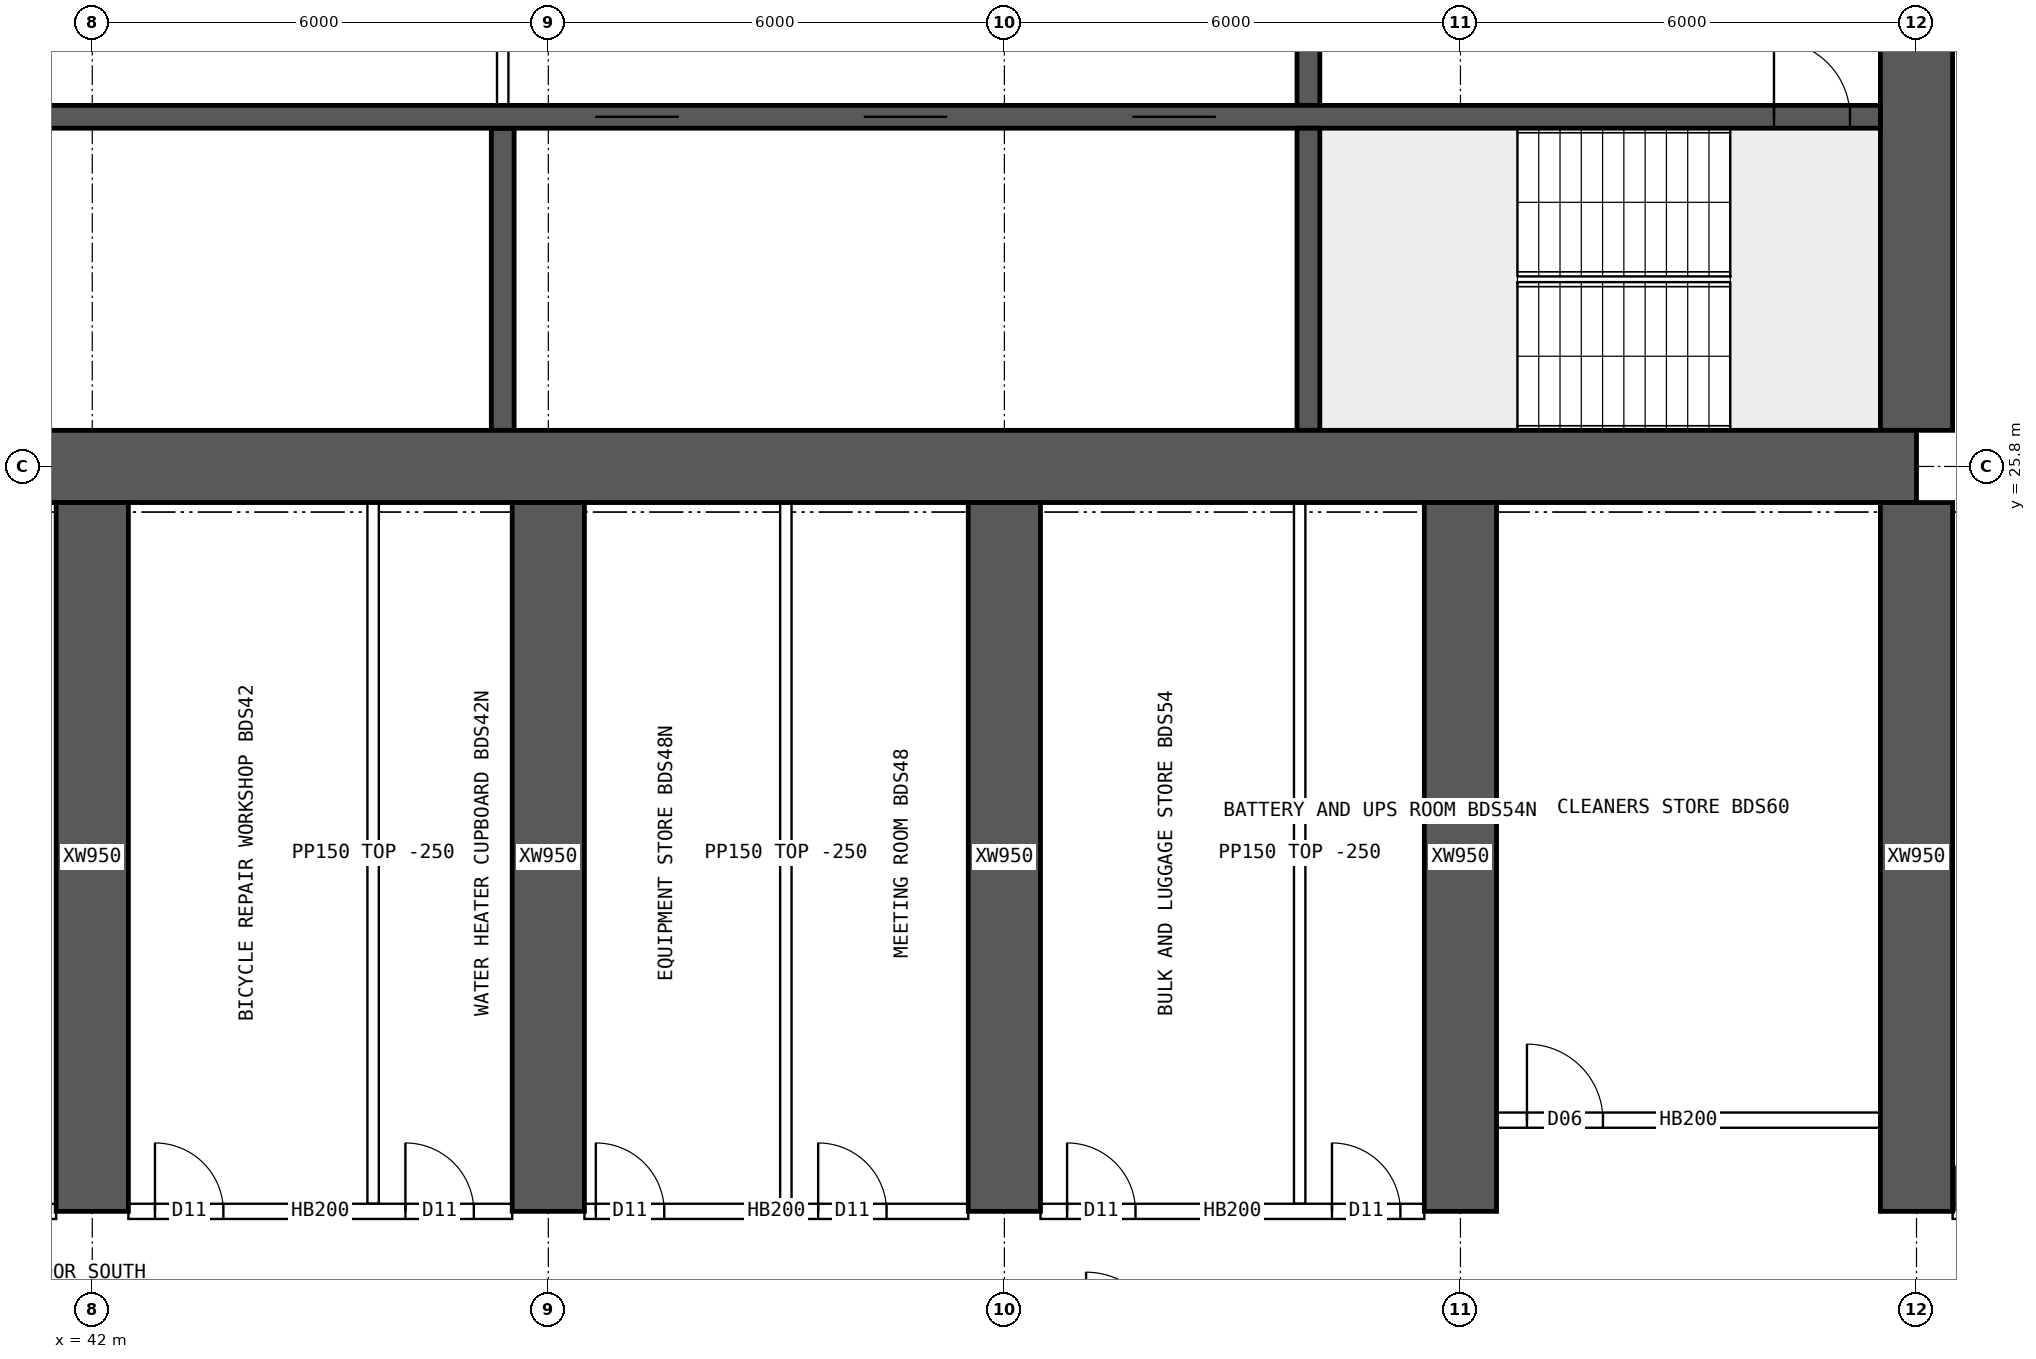
"""IFC4 building model, lengths in metres.
Left out: names, types, materials, properties, quantities, classifications, styles, units other than length and angle.
Written with IfcOpenShell. Run it as: python <this file> out.ifc"""

import sys

from ifc_helpers import new_model, si_unit, direction, frame, frame_2d, origin, place, context, subcontext, project, spatial, rectangle, extrude, element, fill, save


model = new_model("IFC4")
c1 = context("Model", 3, precision=1e-05, world=origin(), true_north=direction((0.0, 1.0)))
c2 = subcontext(c1, "Body", "Model", "MODEL_VIEW")
j1 = project(units=[si_unit("LENGTHUNIT", "METRE"), si_unit("PLANEANGLEUNIT", "RADIAN")], contexts=[c1])
p1 = place(None, origin())
s1 = spatial("IfcSite", under=j1, at=p1, CompositionType="ELEMENT")
p2 = place(p1, origin())
s2 = spatial("IfcBuilding", under=s1, at=p2, CompositionType="ELEMENT")
p3 = place(p2, frame((0.0, 0.0, 103.15)))
s3 = spatial("IfcBuildingStorey", under=s2, at=p3, CompositionType="ELEMENT", Elevation=103.15)
p4 = place(p3, frame((18.0, 25.8, 0.0), z_axis=(0.0, 0.0, 1.0), x_axis=(1.0, 0.0, 0.0)))
e1 = element("IfcWall", 1, at=p4, inside=s3, PredefinedType="SHEAR", context=c2, shape_type="SweptSolid", body=[
    extrude(rectangle(XDim=48.0, YDim=0.95, at=frame_2d((24.0, 0.0))), origin(), (0.0, 0.0, 1.0), 3.75),
])
p5 = place(p3, frame((66.0, 26.275, 0.0), z_axis=(0.0, 0.0, 1.0), x_axis=(0.0, 1.0, 0.0)))
e2 = element("IfcWall", 2, at=p5, inside=s3, PredefinedType="SHEAR", context=c2, shape_type="SweptSolid", body=[
    extrude(rectangle(XDim=11.45, YDim=0.95, at=frame_2d((5.725, 0.0))), origin(), (0.0, 0.0, 1.0), 3.75),
])
p6 = place(p5, frame((5.025, 0.0, 0.0)))
e3 = element("IfcOpeningElement", 3, at=p6, cuts=e2, PredefinedType="OPENING", context=c2, shape_type="SweptSolid", body=[
    extrude(rectangle(XDim=1.2, YDim=2.1, at=frame_2d((0.6, 1.05))), frame((0.0, 0.485, 0.0), z_axis=(0.0, -1.0, 0.0), x_axis=(1.0, 0.0, 0.0)), (0.0, 0.0, 1.0), 0.97),
])
p7 = place(p3, frame((18.475, 30.4, 0.0), z_axis=(0.0, 0.0, 1.0), x_axis=(1.0, 0.0, 0.0)))
e4 = element("IfcWall", 4, at=p7, inside=s3, PredefinedType="SHEAR", context=c2, shape_type="SweptSolid", body=[
    extrude(rectangle(XDim=47.05, YDim=0.3, at=frame_2d((23.525, 0.0))), origin(), (0.0, 0.0, 1.0), 3.75),
])
p8 = place(p7, frame((0.4, 0.0, 0.0)))
e5 = element("IfcOpeningElement", 5, at=p8, cuts=e4, PredefinedType="OPENING", context=c2, shape_type="SweptSolid", body=[
    extrude(rectangle(XDim=1.0, YDim=2.1, at=frame_2d((0.5, 1.05))), frame((0.0, 0.16, 0.0), z_axis=(0.0, -1.0, 0.0), x_axis=(1.0, 0.0, 0.0)), (0.0, 0.0, 1.0), 0.32),
])
p9 = place(p7, frame((45.65, 0.0, 0.0)))
e6 = element("IfcOpeningElement", 6, at=p9, cuts=e4, PredefinedType="OPENING", context=c2, shape_type="SweptSolid", body=[
    extrude(rectangle(XDim=1.0, YDim=2.1, at=frame_2d((0.5, 1.05))), frame((0.0, 0.16, 0.0), z_axis=(0.0, -1.0, 0.0), x_axis=(1.0, 0.0, 0.0)), (0.0, 0.0, 1.0), 0.32),
])
p10 = place(p7, frame((8.275, 0.0, 0.0)))
e7 = element("IfcOpeningElement", 7, at=p10, cuts=e4, PredefinedType="OPENING", context=c2, shape_type="SweptSolid", body=[
    extrude(rectangle(XDim=1.1, YDim=2.1, at=frame_2d((0.55, 1.05))), frame((0.0, 0.16, 0.0), z_axis=(0.0, -1.0, 0.0), x_axis=(1.0, 0.0, 0.0)), (0.0, 0.0, 1.0), 0.32),
])
p11 = place(p7, frame((10.875, 0.0, 0.0)))
e8 = element("IfcOpeningElement", 8, at=p11, cuts=e4, PredefinedType="OPENING", context=c2, shape_type="SweptSolid", body=[
    extrude(rectangle(XDim=1.1, YDim=2.1, at=frame_2d((0.55, 1.05))), frame((0.0, 0.16, 0.0), z_axis=(0.0, -1.0, 0.0), x_axis=(1.0, 0.0, 0.0)), (0.0, 0.0, 1.0), 0.32),
])
p12 = place(p7, frame((13.475, 0.0, 0.0)))
e9 = element("IfcOpeningElement", 9, at=p12, cuts=e4, PredefinedType="OPENING", context=c2, shape_type="SweptSolid", body=[
    extrude(rectangle(XDim=1.1, YDim=2.1, at=frame_2d((0.55, 1.05))), frame((0.0, 0.16, 0.0), z_axis=(0.0, -1.0, 0.0), x_axis=(1.0, 0.0, 0.0)), (0.0, 0.0, 1.0), 0.32),
])
p13 = place(p7, frame((16.075, 0.0, 0.0)))
e10 = element("IfcOpeningElement", 10, at=p13, cuts=e4, PredefinedType="OPENING", context=c2, shape_type="SweptSolid", body=[
    extrude(rectangle(XDim=1.1, YDim=2.1, at=frame_2d((0.55, 1.05))), frame((0.0, 0.16, 0.0), z_axis=(0.0, -1.0, 0.0), x_axis=(1.0, 0.0, 0.0)), (0.0, 0.0, 1.0), 0.32),
])
p14 = place(p7, frame((18.85, 0.0, 0.0)))
e11 = element("IfcOpeningElement", 11, at=p14, cuts=e4, PredefinedType="OPENING", context=c2, shape_type="SweptSolid", body=[
    extrude(rectangle(XDim=0.9, YDim=2.1, at=frame_2d((0.45, 1.05))), frame((0.0, 0.16, 0.0), z_axis=(0.0, -1.0, 0.0), x_axis=(1.0, 0.0, 0.0)), (0.0, 0.0, 1.0), 0.32),
])
p15 = place(p7, frame((30.142, 0.0, 0.0)))
e12 = element("IfcOpeningElement", 12, at=p15, cuts=e4, PredefinedType="OPENING", context=c2, shape_type="SweptSolid", body=[
    extrude(rectangle(XDim=1.1, YDim=2.1, at=frame_2d((0.55, 1.05))), frame((0.0, 0.16, 0.0), z_axis=(0.0, -1.0, 0.0), x_axis=(1.0, 0.0, 0.0)), (0.0, 0.0, 1.0), 0.32),
])
p16 = place(p7, frame((33.675, 0.0, 0.0)))
e13 = element("IfcOpeningElement", 13, at=p16, cuts=e4, PredefinedType="OPENING", context=c2, shape_type="SweptSolid", body=[
    extrude(rectangle(XDim=1.1, YDim=2.1, at=frame_2d((0.55, 1.05))), frame((0.0, 0.16, 0.0), z_axis=(0.0, -1.0, 0.0), x_axis=(1.0, 0.0, 0.0)), (0.0, 0.0, 1.0), 0.32),
])
p17 = place(p7, frame((37.208, 0.0, 0.0)))
e14 = element("IfcOpeningElement", 14, at=p17, cuts=e4, PredefinedType="OPENING", context=c2, shape_type="SweptSolid", body=[
    extrude(rectangle(XDim=1.1, YDim=2.1, at=frame_2d((0.55, 1.05))), frame((0.0, 0.16, 0.0), z_axis=(0.0, -1.0, 0.0), x_axis=(1.0, 0.0, 0.0)), (0.0, 0.0, 1.0), 0.32),
])
p18 = place(p3, frame((58.0, 26.275, 0.0), z_axis=(0.0, 0.0, 1.0), x_axis=(0.0, 1.0, 0.0)))
e15 = element("IfcWall", 15, at=p18, inside=s3, PredefinedType="SHEAR", context=c2, shape_type="SweptSolid", body=[
    extrude(rectangle(XDim=3.975, YDim=0.3, at=frame_2d((1.988, 0.0))), origin(), (0.0, 0.0, 1.0), 3.75),
])
p19 = place(p3, frame((58.0, 30.55, 0.0), z_axis=(0.0, 0.0, 1.0), x_axis=(0.0, 1.0, 0.0)))
e16 = element("IfcWall", 16, at=p19, inside=s3, PredefinedType="SHEAR", context=c2, shape_type="SweptSolid", body=[
    extrude(rectangle(XDim=3.9, YDim=0.3, at=frame_2d((1.95, 0.0))), origin(), (0.0, 0.0, 1.0), 3.75),
])
p20 = place(p19, frame((1.4, 0.0, 0.0)))
e17 = element("IfcOpeningElement", 17, at=p20, cuts=e16, PredefinedType="OPENING", context=c2, shape_type="SweptSolid", body=[
    extrude(rectangle(XDim=1.2, YDim=2.1, at=frame_2d((0.6, 1.05))), frame((0.0, 0.16, 0.0), z_axis=(0.0, -1.0, 0.0), x_axis=(1.0, 0.0, 0.0)), (0.0, 0.0, 1.0), 0.32),
])
p21 = place(p3, frame((47.4, 26.275, 0.0), z_axis=(0.0, 0.0, 1.0), x_axis=(0.0, 1.0, 0.0)))
e18 = element("IfcWall", 18, at=p21, inside=s3, PredefinedType="SHEAR", context=c2, shape_type="SweptSolid", body=[
    extrude(rectangle(XDim=3.975, YDim=0.3, at=frame_2d((1.988, 0.0))), origin(), (0.0, 0.0, 1.0), 3.75),
])
for number, where, z_axis, x_axis in (
    (19, (42.0, 16.0, 0.0), (0.0, 0.0, 1.0), (0.0, 1.0, 0.0)),
    (20, (48.0, 16.0, 0.0), (0.0, 0.0, 1.0), (0.0, 1.0, 0.0)),
    (21, (54.0, 16.0, 0.0), (0.0, 0.0, 1.0), (0.0, 1.0, 0.0)),
    (22, (60.0, 16.0, 0.0), (0.0, 0.0, 1.0), (0.0, 1.0, 0.0)),
    (23, (66.0, 16.0, 0.0), (0.0, 0.0, 1.0), (0.0, 1.0, 0.0)),
):
    element("IfcWall", number, at=place(p3, frame(where, z_axis=z_axis, x_axis=x_axis)), inside=s3, PredefinedType="SHEAR", context=c2, shape_type="SweptSolid", body=[
        extrude(rectangle(XDim=9.325, YDim=0.95, at=frame_2d((4.663, 0.0))), origin(), (0.0, 0.0, 1.0), 3.75),
    ])
p22 = place(p3, frame((47.4, 30.55, 0.0), z_axis=(0.0, 0.0, 1.0), x_axis=(0.0, 1.0, 0.0)))
e24 = element("IfcWall", 24, at=p22, inside=s3, PredefinedType="SOLIDWALL", context=c2, shape_type="SweptSolid", body=[
    extrude(rectangle(XDim=3.9, YDim=0.15, at=frame_2d((1.95, 0.0))), origin(), (0.0, 0.0, 1.0), 3.5),
])
p23 = place(p22, frame((1.15, 0.0, 0.0)))
e25 = element("IfcOpeningElement", 25, at=p23, cuts=e24, PredefinedType="OPENING", context=c2, shape_type="SweptSolid", body=[
    extrude(rectangle(XDim=1.6, YDim=2.1, at=frame_2d((0.8, 1.05))), frame((0.0, 0.085, 0.0), z_axis=(0.0, -1.0, 0.0), x_axis=(1.0, 0.0, 0.0)), (0.0, 0.0, 1.0), 0.17),
])
p24 = place(p3, frame((36.475, 16.0, 0.0), z_axis=(0.0, 0.0, 1.0), x_axis=(1.0, 0.0, 0.0)))
e26 = element("IfcWall", 26, at=p24, inside=s3, PredefinedType="SOLIDWALL", context=c2, shape_type="SweptSolid", body=[
    extrude(rectangle(XDim=5.05, YDim=0.2, at=frame_2d((2.525, 0.0))), origin(), (0.0, 0.0, 1.0), 3.5),
])
p25 = place(p24, frame((0.4, 0.0, 0.0)))
e27 = element("IfcOpeningElement", 27, at=p25, cuts=e26, PredefinedType="OPENING", context=c2, shape_type="SweptSolid", body=[
    extrude(rectangle(XDim=1.0, YDim=2.1, at=frame_2d((0.5, 1.05))), frame((0.0, 0.11, 0.0), z_axis=(0.0, -1.0, 0.0), x_axis=(1.0, 0.0, 0.0)), (0.0, 0.0, 1.0), 0.22),
])
p26 = place(p3, frame((42.475, 16.0, 0.0), z_axis=(0.0, 0.0, 1.0), x_axis=(1.0, 0.0, 0.0)))
e28 = element("IfcWall", 28, at=p26, inside=s3, PredefinedType="SOLIDWALL", context=c2, shape_type="SweptSolid", body=[
    extrude(rectangle(XDim=5.05, YDim=0.2, at=frame_2d((2.525, 0.0))), origin(), (0.0, 0.0, 1.0), 3.5),
])
p27 = place(p26, frame((0.35, 0.0, 0.0)))
e29 = element("IfcOpeningElement", 29, at=p27, cuts=e28, PredefinedType="OPENING", context=c2, shape_type="SweptSolid", body=[
    extrude(rectangle(XDim=0.9, YDim=2.1, at=frame_2d((0.45, 1.05))), frame((0.0, 0.11, 0.0), z_axis=(0.0, -1.0, 0.0), x_axis=(1.0, 0.0, 0.0)), (0.0, 0.0, 1.0), 0.22),
])
p28 = place(p26, frame((3.645, 0.0, 0.0)))
e30 = element("IfcOpeningElement", 30, at=p28, cuts=e28, PredefinedType="OPENING", context=c2, shape_type="SweptSolid", body=[
    extrude(rectangle(XDim=0.9, YDim=2.1, at=frame_2d((0.45, 1.05))), frame((0.0, 0.11, 0.0), z_axis=(0.0, -1.0, 0.0), x_axis=(1.0, 0.0, 0.0)), (0.0, 0.0, 1.0), 0.22),
])
p29 = place(p3, frame((48.475, 16.0, 0.0), z_axis=(0.0, 0.0, 1.0), x_axis=(1.0, 0.0, 0.0)))
e31 = element("IfcWall", 31, at=p29, inside=s3, PredefinedType="SOLIDWALL", context=c2, shape_type="SweptSolid", body=[
    extrude(rectangle(XDim=5.05, YDim=0.2, at=frame_2d((2.525, 0.0))), origin(), (0.0, 0.0, 1.0), 3.5),
])
p30 = place(p29, frame((0.15, 0.0, 0.0)))
e32 = element("IfcOpeningElement", 32, at=p30, cuts=e31, PredefinedType="OPENING", context=c2, shape_type="SweptSolid", body=[
    extrude(rectangle(XDim=0.9, YDim=2.1, at=frame_2d((0.45, 1.05))), frame((0.0, 0.11, 0.0), z_axis=(0.0, -1.0, 0.0), x_axis=(1.0, 0.0, 0.0)), (0.0, 0.0, 1.0), 0.22),
])
p31 = place(p29, frame((3.075, 0.0, 0.0)))
e33 = element("IfcOpeningElement", 33, at=p31, cuts=e31, PredefinedType="OPENING", context=c2, shape_type="SweptSolid", body=[
    extrude(rectangle(XDim=0.9, YDim=2.1, at=frame_2d((0.45, 1.05))), frame((0.0, 0.11, 0.0), z_axis=(0.0, -1.0, 0.0), x_axis=(1.0, 0.0, 0.0)), (0.0, 0.0, 1.0), 0.22),
])
p32 = place(p3, frame((54.475, 16.0, 0.0), z_axis=(0.0, 0.0, 1.0), x_axis=(1.0, 0.0, 0.0)))
e34 = element("IfcWall", 34, at=p32, inside=s3, PredefinedType="SOLIDWALL", context=c2, shape_type="SweptSolid", body=[
    extrude(rectangle(XDim=5.05, YDim=0.2, at=frame_2d((2.525, 0.0))), origin(), (0.0, 0.0, 1.0), 3.5),
])
p33 = place(p32, frame((0.35, 0.0, 0.0)))
e35 = element("IfcOpeningElement", 35, at=p33, cuts=e34, PredefinedType="OPENING", context=c2, shape_type="SweptSolid", body=[
    extrude(rectangle(XDim=0.9, YDim=2.1, at=frame_2d((0.45, 1.05))), frame((0.0, 0.11, 0.0), z_axis=(0.0, -1.0, 0.0), x_axis=(1.0, 0.0, 0.0)), (0.0, 0.0, 1.0), 0.22),
])
p34 = place(p32, frame((3.835, 0.0, 0.0)))
e36 = element("IfcOpeningElement", 36, at=p34, cuts=e34, PredefinedType="OPENING", context=c2, shape_type="SweptSolid", body=[
    extrude(rectangle(XDim=0.9, YDim=2.1, at=frame_2d((0.45, 1.05))), frame((0.0, 0.11, 0.0), z_axis=(0.0, -1.0, 0.0), x_axis=(1.0, 0.0, 0.0)), (0.0, 0.0, 1.0), 0.22),
])
p35 = place(p3, frame((66.475, 16.0, 0.0), z_axis=(0.0, 0.0, 1.0), x_axis=(1.0, 0.0, 0.0)))
e37 = element("IfcWall", 37, at=p35, inside=s3, PredefinedType="SOLIDWALL", context=c2, shape_type="SweptSolid", body=[
    extrude(rectangle(XDim=1.925, YDim=0.2, at=frame_2d((0.962, 0.0))), origin(), (0.0, 0.0, 1.0), 3.5),
])
p36 = place(p35, frame((0.05, 0.0, 0.0)))
e38 = element("IfcOpeningElement", 38, at=p36, cuts=e37, PredefinedType="OPENING", context=c2, shape_type="SweptSolid", body=[
    extrude(rectangle(XDim=1.2, YDim=2.1, at=frame_2d((0.6, 1.05))), frame((0.0, 0.11, 0.0), z_axis=(0.0, -1.0, 0.0), x_axis=(1.0, 0.0, 0.0)), (0.0, 0.0, 1.0), 0.22),
])
for number, where, z_axis, x_axis in (
    (39, (45.695, 16.1, 0.0), (0.0, 0.0, 1.0), (0.0, 1.0, 0.0)),
    (40, (51.125, 16.1, 0.0), (0.0, 0.0, 1.0), (0.0, 1.0, 0.0)),
    (41, (57.885, 16.1, 0.0), (0.0, 0.0, 1.0), (0.0, 1.0, 0.0)),
):
    element("IfcWall", number, at=place(p3, frame(where, z_axis=z_axis, x_axis=x_axis)), inside=s3, PredefinedType="PARTITIONING", context=c2, shape_type="SweptSolid", body=[
        extrude(rectangle(XDim=9.225, YDim=0.15, at=frame_2d((4.612, 0.0))), origin(), (0.0, 0.0, 1.0), 3.5),
    ])
p37 = place(p3, frame((60.475, 17.2, 0.0), z_axis=(0.0, 0.0, 1.0), x_axis=(1.0, 0.0, 0.0)))
e42 = element("IfcWall", 42, at=p37, inside=s3, PredefinedType="SOLIDWALL", context=c2, shape_type="SweptSolid", body=[
    extrude(rectangle(XDim=5.05, YDim=0.2, at=frame_2d((2.525, 0.0))), origin(), (0.0, 0.0, 1.0), 3.5),
])
p38 = place(p37, frame((0.4, 0.0, 0.0)))
e43 = element("IfcOpeningElement", 43, at=p38, cuts=e42, PredefinedType="OPENING", context=c2, shape_type="SweptSolid", body=[
    extrude(rectangle(XDim=1.0, YDim=2.1, at=frame_2d((0.5, 1.05))), frame((0.0, 0.11, 0.0), z_axis=(0.0, -1.0, 0.0), x_axis=(1.0, 0.0, 0.0)), (0.0, 0.0, 1.0), 0.22),
])
p39 = place(p9, origin())
e44 = element("IfcDoor", 44, at=p39, inside=s3, OperationType="SINGLE_SWING_LEFT", PredefinedType="DOOR", context=c2, shape_type="SweptSolid", body=[
    extrude(rectangle(XDim=1.0, YDim=2.1, at=frame_2d((0.5, 1.05))), frame((0.0, 0.025, 0.0), z_axis=(0.0, -1.0, 0.0), x_axis=(1.0, 0.0, 0.0)), (0.0, 0.0, 1.0), 0.05),
])
fill(e6, e44)
p40 = place(p15, origin())
e45 = element("IfcDoor", 45, at=p40, inside=s3, OperationType="DOUBLE_DOOR_SLIDING", PredefinedType="DOOR", context=c2, shape_type="SweptSolid", body=[
    extrude(rectangle(XDim=1.1, YDim=2.1, at=frame_2d((0.55, 1.05))), frame((0.0, 0.025, 0.0), z_axis=(0.0, -1.0, 0.0), x_axis=(1.0, 0.0, 0.0)), (0.0, 0.0, 1.0), 0.05),
])
fill(e12, e45)
p41 = place(p16, origin())
e46 = element("IfcDoor", 46, at=p41, inside=s3, OperationType="DOUBLE_DOOR_SLIDING", PredefinedType="DOOR", context=c2, shape_type="SweptSolid", body=[
    extrude(rectangle(XDim=1.1, YDim=2.1, at=frame_2d((0.55, 1.05))), frame((0.0, 0.025, 0.0), z_axis=(0.0, -1.0, 0.0), x_axis=(1.0, 0.0, 0.0)), (0.0, 0.0, 1.0), 0.05),
])
fill(e13, e46)
p42 = place(p17, origin())
e47 = element("IfcDoor", 47, at=p42, inside=s3, OperationType="DOUBLE_DOOR_SLIDING", PredefinedType="DOOR", context=c2, shape_type="SweptSolid", body=[
    extrude(rectangle(XDim=1.1, YDim=2.1, at=frame_2d((0.55, 1.05))), frame((0.0, 0.025, 0.0), z_axis=(0.0, -1.0, 0.0), x_axis=(1.0, 0.0, 0.0)), (0.0, 0.0, 1.0), 0.05),
])
fill(e14, e47)
p43 = place(p27, origin())
e48 = element("IfcDoor", 48, at=p43, inside=s3, OperationType="SINGLE_SWING_LEFT", PredefinedType="DOOR", context=c2, shape_type="SweptSolid", body=[
    extrude(rectangle(XDim=0.9, YDim=2.1, at=frame_2d((0.45, 1.05))), frame((0.0, 0.025, 0.0), z_axis=(0.0, -1.0, 0.0), x_axis=(1.0, 0.0, 0.0)), (0.0, 0.0, 1.0), 0.05),
])
fill(e29, e48)
p44 = place(p28, origin())
e49 = element("IfcDoor", 49, at=p44, inside=s3, OperationType="SINGLE_SWING_LEFT", PredefinedType="DOOR", context=c2, shape_type="SweptSolid", body=[
    extrude(rectangle(XDim=0.9, YDim=2.1, at=frame_2d((0.45, 1.05))), frame((0.0, 0.025, 0.0), z_axis=(0.0, -1.0, 0.0), x_axis=(1.0, 0.0, 0.0)), (0.0, 0.0, 1.0), 0.05),
])
fill(e30, e49)
p45 = place(p30, origin())
e50 = element("IfcDoor", 50, at=p45, inside=s3, OperationType="SINGLE_SWING_LEFT", PredefinedType="DOOR", context=c2, shape_type="SweptSolid", body=[
    extrude(rectangle(XDim=0.9, YDim=2.1, at=frame_2d((0.45, 1.05))), frame((0.0, 0.025, 0.0), z_axis=(0.0, -1.0, 0.0), x_axis=(1.0, 0.0, 0.0)), (0.0, 0.0, 1.0), 0.05),
])
fill(e32, e50)
p46 = place(p31, origin())
e51 = element("IfcDoor", 51, at=p46, inside=s3, OperationType="SINGLE_SWING_LEFT", PredefinedType="DOOR", context=c2, shape_type="SweptSolid", body=[
    extrude(rectangle(XDim=0.9, YDim=2.1, at=frame_2d((0.45, 1.05))), frame((0.0, 0.025, 0.0), z_axis=(0.0, -1.0, 0.0), x_axis=(1.0, 0.0, 0.0)), (0.0, 0.0, 1.0), 0.05),
])
fill(e33, e51)
p47 = place(p33, origin())
e52 = element("IfcDoor", 52, at=p47, inside=s3, OperationType="SINGLE_SWING_LEFT", PredefinedType="DOOR", context=c2, shape_type="SweptSolid", body=[
    extrude(rectangle(XDim=0.9, YDim=2.1, at=frame_2d((0.45, 1.05))), frame((0.0, 0.025, 0.0), z_axis=(0.0, -1.0, 0.0), x_axis=(1.0, 0.0, 0.0)), (0.0, 0.0, 1.0), 0.05),
])
fill(e35, e52)
p48 = place(p34, origin())
e53 = element("IfcDoor", 53, at=p48, inside=s3, OperationType="SINGLE_SWING_LEFT", PredefinedType="DOOR", context=c2, shape_type="SweptSolid", body=[
    extrude(rectangle(XDim=0.9, YDim=2.1, at=frame_2d((0.45, 1.05))), frame((0.0, 0.025, 0.0), z_axis=(0.0, -1.0, 0.0), x_axis=(1.0, 0.0, 0.0)), (0.0, 0.0, 1.0), 0.05),
])
fill(e36, e53)
p49 = place(p38, origin())
e54 = element("IfcDoor", 54, at=p49, inside=s3, OperationType="SINGLE_SWING_LEFT", PredefinedType="DOOR", context=c2, shape_type="SweptSolid", body=[
    extrude(rectangle(XDim=1.0, YDim=2.1, at=frame_2d((0.5, 1.05))), frame((0.0, 0.025, 0.0), z_axis=(0.0, -1.0, 0.0), x_axis=(1.0, 0.0, 0.0)), (0.0, 0.0, 1.0), 0.05),
])
fill(e43, e54)
save(model, sys.argv[1])
